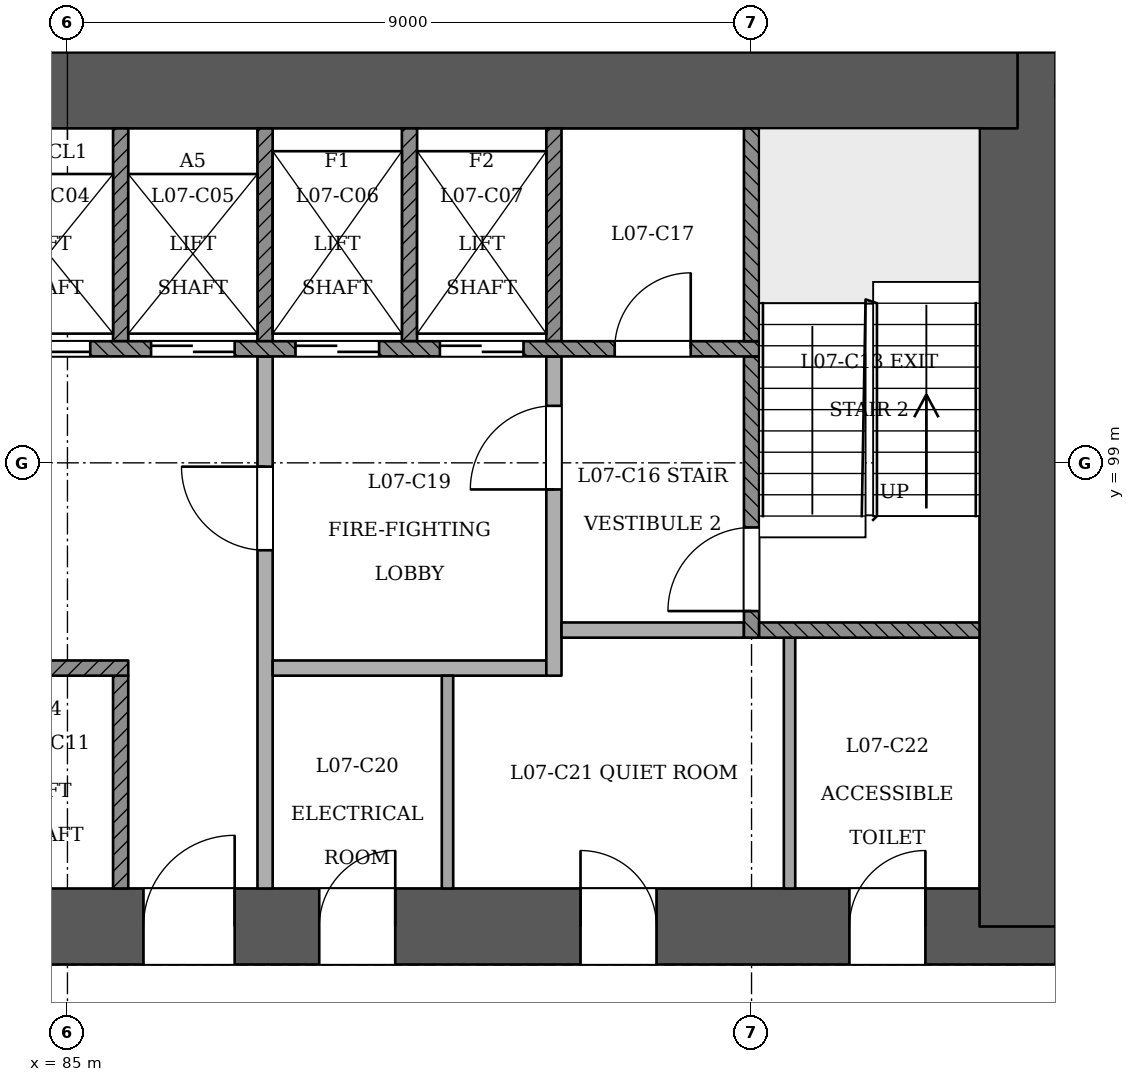
"""IFC4 building model, lengths in metres.
Left out: names, types, materials, properties, quantities, classifications, styles, units other than length and angle.
Written with IfcOpenShell. Run it as: python <this file> out.ifc"""

import sys

from ifc_helpers import new_model, si_unit, direction, frame, frame_2d, origin, place, context, subcontext, project, spatial, rectangle, extrude, element, fill, save


model = new_model("IFC4")
c1 = context("Model", 3, precision=1e-05, world=origin(), true_north=direction((0.0, 1.0)))
c2 = subcontext(c1, "Body", "Model", "MODEL_VIEW")
j1 = project(units=[si_unit("LENGTHUNIT", "METRE"), si_unit("PLANEANGLEUNIT", "RADIAN")], contexts=[c1])
p1 = place(None, origin())
s1 = spatial("IfcSite", under=j1, at=p1, CompositionType="ELEMENT")
p2 = place(p1, origin())
s2 = spatial("IfcBuilding", under=s1, at=p2, CompositionType="ELEMENT")
p3 = place(p2, frame((0.0, 0.0, 34.2)))
s3 = spatial("IfcBuildingStorey", under=s2, at=p3, CompositionType="ELEMENT", Elevation=34.2)
p4 = place(p3, frame((72.5, 92.9, 0.0), z_axis=(0.0, 0.0, 1.0), x_axis=(1.0, 0.0, 0.0)))
e1 = element("IfcWall", 1, at=p4, inside=s3, PredefinedType="SHEAR", context=c2, shape_type="SweptSolid", body=[
    extrude(rectangle(XDim=25.5, YDim=1.0, at=frame_2d((12.75, 0.0))), origin(), (0.0, 0.0, 1.0), 3.6),
])
p5 = place(p4, frame((1.3, 0.0, 0.0)))
e2 = element("IfcOpeningElement", 2, at=p5, cuts=e1, PredefinedType="OPENING", context=c2, shape_type="SweptSolid", body=[
    extrude(rectangle(XDim=1.2, YDim=2.1, at=frame_2d((0.6, 1.05))), frame((0.0, 0.51, 0.0), z_axis=(0.0, -1.0, 0.0), x_axis=(1.0, 0.0, 0.0)), (0.0, 0.0, 1.0), 1.021),
])
p6 = place(p4, frame((3.5, 0.0, 0.0)))
e3 = element("IfcOpeningElement", 3, at=p6, cuts=e1, PredefinedType="OPENING", context=c2, shape_type="SweptSolid", body=[
    extrude(rectangle(XDim=1.2, YDim=2.1, at=frame_2d((0.6, 1.05))), frame((0.0, 0.51, 0.0), z_axis=(0.0, -1.0, 0.0), x_axis=(1.0, 0.0, 0.0)), (0.0, 0.0, 1.0), 1.021),
])
p7 = place(p4, frame((13.5, 0.0, 0.0)))
e4 = element("IfcOpeningElement", 4, at=p7, cuts=e1, PredefinedType="OPENING", context=c2, shape_type="SweptSolid", body=[
    extrude(rectangle(XDim=1.2, YDim=2.1, at=frame_2d((0.6, 1.05))), frame((0.0, 0.51, 0.0), z_axis=(0.0, -1.0, 0.0), x_axis=(1.0, 0.0, 0.0)), (0.0, 0.0, 1.0), 1.021),
])
p8 = place(p4, frame((15.812, 0.0, 0.0)))
e5 = element("IfcOpeningElement", 5, at=p8, cuts=e1, PredefinedType="OPENING", context=c2, shape_type="SweptSolid", body=[
    extrude(rectangle(XDim=1.0, YDim=2.1, at=frame_2d((0.5, 1.05))), frame((0.0, 0.51, 0.0), z_axis=(0.0, -1.0, 0.0), x_axis=(1.0, 0.0, 0.0)), (0.0, 0.0, 1.0), 1.021),
])
p9 = place(p4, frame((19.25, 0.0, 0.0)))
e6 = element("IfcOpeningElement", 6, at=p9, cuts=e1, PredefinedType="OPENING", context=c2, shape_type="SweptSolid", body=[
    extrude(rectangle(XDim=1.0, YDim=2.1, at=frame_2d((0.5, 1.05))), frame((0.0, 0.51, 0.0), z_axis=(0.0, -1.0, 0.0), x_axis=(1.0, 0.0, 0.0)), (0.0, 0.0, 1.0), 1.021),
])
p10 = place(p4, frame((22.788, 0.0, 0.0)))
e7 = element("IfcOpeningElement", 7, at=p10, cuts=e1, PredefinedType="OPENING", context=c2, shape_type="SweptSolid", body=[
    extrude(rectangle(XDim=1.0, YDim=2.1, at=frame_2d((0.5, 1.05))), frame((0.0, 0.51, 0.0), z_axis=(0.0, -1.0, 0.0), x_axis=(1.0, 0.0, 0.0)), (0.0, 0.0, 1.0), 1.021),
])
p11 = place(p3, frame((97.5, 92.9, 0.0), z_axis=(0.0, 0.0, 1.0), x_axis=(0.0, 1.0, 0.0)))
e8 = element("IfcWall", 8, at=p11, inside=s3, PredefinedType="SHEAR", context=c2, shape_type="SweptSolid", body=[
    extrude(rectangle(XDim=11.5, YDim=1.0, at=frame_2d((5.75, 0.0))), origin(), (0.0, 0.0, 1.0), 3.6),
])
p12 = place(p3, frame((97.5, 103.9, 0.0), z_axis=(0.0, 0.0, 1.0), x_axis=(-1.0, 0.0, 0.0)))
e9 = element("IfcWall", 9, at=p12, inside=s3, PredefinedType="SHEAR", context=c2, shape_type="SweptSolid", body=[
    extrude(rectangle(XDim=25.5, YDim=1.0, at=frame_2d((12.75, 0.0))), origin(), (0.0, 0.0, 1.0), 3.6),
])
p13 = place(p3, frame((86.17, 57.581, 0.0), z_axis=(0.0, 0.0, 1.0), x_axis=(0.499999785607, 0.866025527565, 0.0)))
e10 = element("IfcWall", 10, at=p13, inside=s3, PredefinedType="PARTITIONING", context=c2, shape_type="SweptSolid", body=[
    extrude(rectangle(XDim=44.909, YDim=0.15, at=frame_2d((22.454, 0.0))), origin(), (0.0, 0.0, 1.0), 2.7),
])
p14 = place(p13, frame((0.675, 0.0, 0.0)))
e11 = element("IfcOpeningElement", 11, at=p14, cuts=e10, PredefinedType="OPENING", context=c2, shape_type="SweptSolid", body=[
    extrude(rectangle(XDim=1.0, YDim=2.1, at=frame_2d((0.5, 1.05))), frame((0.0, 0.085, 0.0), z_axis=(0.0, -1.0, 0.0), x_axis=(1.0, 0.0, 0.0)), (0.0, 0.0, 1.0), 0.171),
])
p15 = place(p13, frame((5.175, 0.0, 0.0)))
e12 = element("IfcOpeningElement", 12, at=p15, cuts=e10, PredefinedType="OPENING", context=c2, shape_type="SweptSolid", body=[
    extrude(rectangle(XDim=1.0, YDim=2.1, at=frame_2d((0.5, 1.05))), frame((0.0, 0.085, 0.0), z_axis=(0.0, -1.0, 0.0), x_axis=(1.0, 0.0, 0.0)), (0.0, 0.0, 1.0), 0.171),
])
p16 = place(p13, frame((11.734, 0.0, 0.0)))
e13 = element("IfcOpeningElement", 13, at=p16, cuts=e10, PredefinedType="OPENING", context=c2, shape_type="SweptSolid", body=[
    extrude(rectangle(XDim=1.0, YDim=2.1, at=frame_2d((0.5, 1.05))), frame((0.0, 0.085, 0.0), z_axis=(0.0, -1.0, 0.0), x_axis=(1.0, 0.0, 0.0)), (0.0, 0.0, 1.0), 0.171),
])
p17 = place(p13, frame((14.175, 0.0, 0.0)))
e14 = element("IfcOpeningElement", 14, at=p17, cuts=e10, PredefinedType="OPENING", context=c2, shape_type="SweptSolid", body=[
    extrude(rectangle(XDim=1.0, YDim=2.1, at=frame_2d((0.5, 1.05))), frame((0.0, 0.085, 0.0), z_axis=(0.0, -1.0, 0.0), x_axis=(1.0, 0.0, 0.0)), (0.0, 0.0, 1.0), 0.171),
])
p18 = place(p13, frame((19.704, 0.0, 0.0)))
e15 = element("IfcOpeningElement", 15, at=p18, cuts=e10, PredefinedType="OPENING", context=c2, shape_type="SweptSolid", body=[
    extrude(rectangle(XDim=1.0, YDim=2.1, at=frame_2d((0.5, 1.05))), frame((0.0, 0.085, 0.0), z_axis=(0.0, -1.0, 0.0), x_axis=(1.0, 0.0, 0.0)), (0.0, 0.0, 1.0), 0.171),
])
p19 = place(p13, frame((23.175, 0.0, 0.0)))
e16 = element("IfcOpeningElement", 16, at=p19, cuts=e10, PredefinedType="OPENING", context=c2, shape_type="SweptSolid", body=[
    extrude(rectangle(XDim=1.0, YDim=2.1, at=frame_2d((0.5, 1.05))), frame((0.0, 0.085, 0.0), z_axis=(0.0, -1.0, 0.0), x_axis=(1.0, 0.0, 0.0)), (0.0, 0.0, 1.0), 0.171),
])
p20 = place(p13, frame((29.85, 0.0, 0.0)))
e17 = element("IfcOpeningElement", 17, at=p20, cuts=e10, PredefinedType="OPENING", context=c2, shape_type="SweptSolid", body=[
    extrude(rectangle(XDim=1.0, YDim=2.1, at=frame_2d((0.5, 1.05))), frame((0.0, 0.085, 0.0), z_axis=(0.0, -1.0, 0.0), x_axis=(1.0, 0.0, 0.0)), (0.0, 0.0, 1.0), 0.171),
])
p21 = place(p13, frame((32.059, 0.0, 0.0)))
e18 = element("IfcOpeningElement", 18, at=p21, cuts=e10, PredefinedType="OPENING", context=c2, shape_type="SweptSolid", body=[
    extrude(rectangle(XDim=1.0, YDim=2.1, at=frame_2d((0.5, 1.05))), frame((0.0, 0.085, 0.0), z_axis=(0.0, -1.0, 0.0), x_axis=(1.0, 0.0, 0.0)), (0.0, 0.0, 1.0), 0.171),
])
p22 = place(p13, frame((38.734, 0.0, 0.0)))
e19 = element("IfcOpeningElement", 19, at=p22, cuts=e10, PredefinedType="OPENING", context=c2, shape_type="SweptSolid", body=[
    extrude(rectangle(XDim=1.0, YDim=2.1, at=frame_2d((0.5, 1.05))), frame((0.0, 0.085, 0.0), z_axis=(0.0, -1.0, 0.0), x_axis=(1.0, 0.0, 0.0)), (0.0, 0.0, 1.0), 0.171),
])
p23 = place(p13, frame((41.025, 0.0, 0.0)))
e20 = element("IfcOpeningElement", 20, at=p23, cuts=e10, PredefinedType="OPENING", context=c2, shape_type="SweptSolid", body=[
    extrude(rectangle(XDim=1.1, YDim=2.1, at=frame_2d((0.55, 1.05))), frame((0.0, 0.085, 0.0), z_axis=(0.0, -1.0, 0.0), x_axis=(1.0, 0.0, 0.0)), (0.0, 0.0, 1.0), 0.171),
])
p24 = place(p3, frame((85.7, 93.4, 0.0), z_axis=(0.0, 0.0, 1.0), x_axis=(0.0, 1.0, 0.0)))
e21 = element("IfcWall", 21, at=p24, inside=s3, PredefinedType="SOLIDWALL", context=c2, shape_type="SweptSolid", body=[
    extrude(rectangle(XDim=2.8, YDim=0.2, at=frame_2d((1.4, 0.0))), origin(), (0.0, 0.0, 1.0), 3.1),
])
p25 = place(p3, frame((87.6, 93.4, 0.0), z_axis=(0.0, 0.0, 1.0), x_axis=(0.0, 1.0, 0.0)))
e22 = element("IfcWall", 22, at=p25, inside=s3, PredefinedType="PARTITIONING", context=c2, shape_type="SweptSolid", body=[
    extrude(rectangle(XDim=7.0, YDim=0.2, at=frame_2d((3.5, 0.0))), origin(), (0.0, 0.0, 1.0), 3.1),
])
p26 = place(p25, frame((4.45, 0.0, 0.0)))
e23 = element("IfcOpeningElement", 23, at=p26, cuts=e22, PredefinedType="OPENING", context=c2, shape_type="SweptSolid", body=[
    extrude(rectangle(XDim=1.1, YDim=2.1, at=frame_2d((0.55, 1.05))), frame((0.0, 0.11, 0.0), z_axis=(0.0, -1.0, 0.0), x_axis=(1.0, 0.0, 0.0)), (0.0, 0.0, 1.0), 0.221),
])
p27 = place(p3, frame((90.0, 93.4, 0.0), z_axis=(0.0, 0.0, 1.0), x_axis=(0.0, 1.0, 0.0)))
e24 = element("IfcWall", 24, at=p27, inside=s3, PredefinedType="PARTITIONING", context=c2, shape_type="SweptSolid", body=[
    extrude(rectangle(XDim=2.8, YDim=0.15, at=frame_2d((1.4, 0.0))), origin(), (0.0, 0.0, 1.0), 3.1),
])
p28 = place(p3, frame((94.5, 93.4, 0.0), z_axis=(0.0, 0.0, 1.0), x_axis=(0.0, 1.0, 0.0)))
e25 = element("IfcWall", 25, at=p28, inside=s3, PredefinedType="PARTITIONING", context=c2, shape_type="SweptSolid", body=[
    extrude(rectangle(XDim=3.3, YDim=0.15, at=frame_2d((1.65, 0.0))), origin(), (0.0, 0.0, 1.0), 3.1),
])
p29 = place(p3, frame((78.0, 96.3, 0.0), z_axis=(0.0, 0.0, 1.0), x_axis=(1.0, 0.0, 0.0)))
e26 = element("IfcWall", 26, at=p29, inside=s3, PredefinedType="SOLIDWALL", context=c2, shape_type="SweptSolid", body=[
    extrude(rectangle(XDim=7.8, YDim=0.2, at=frame_2d((3.9, 0.0))), origin(), (0.0, 0.0, 1.0), 3.1),
])
p30 = place(p3, frame((87.7, 96.3, 0.0), z_axis=(0.0, 0.0, 1.0), x_axis=(1.0, 0.0, 0.0)))
e27 = element("IfcWall", 27, at=p30, inside=s3, PredefinedType="PARTITIONING", context=c2, shape_type="SweptSolid", body=[
    extrude(rectangle(XDim=3.6, YDim=0.2, at=frame_2d((1.8, 0.0))), origin(), (0.0, 0.0, 1.0), 3.1),
])
p31 = place(p3, frame((91.4, 96.2, 0.0), z_axis=(0.0, 0.0, 1.0), x_axis=(0.0, 1.0, 0.0)))
e28 = element("IfcWall", 28, at=p31, inside=s3, PredefinedType="PARTITIONING", context=c2, shape_type="SweptSolid", body=[
    extrude(rectangle(XDim=4.2, YDim=0.2, at=frame_2d((2.1, 0.0))), origin(), (0.0, 0.0, 1.0), 3.1),
])
p32 = place(p31, frame((2.45, 0.0, 0.0)))
e29 = element("IfcOpeningElement", 29, at=p32, cuts=e28, PredefinedType="OPENING", context=c2, shape_type="SweptSolid", body=[
    extrude(rectangle(XDim=1.1, YDim=2.1, at=frame_2d((0.55, 1.05))), frame((0.0, 0.11, 0.0), z_axis=(0.0, -1.0, 0.0), x_axis=(1.0, 0.0, 0.0)), (0.0, 0.0, 1.0), 0.221),
])
p33 = place(p3, frame((91.5, 96.8, 0.0), z_axis=(0.0, 0.0, 1.0), x_axis=(1.0, 0.0, 0.0)))
e30 = element("IfcWall", 30, at=p33, inside=s3, PredefinedType="PARTITIONING", context=c2, shape_type="SweptSolid", body=[
    extrude(rectangle(XDim=2.4, YDim=0.2, at=frame_2d((1.2, 0.0))), origin(), (0.0, 0.0, 1.0), 3.1),
])
p34 = place(p3, frame((94.0, 96.7, 0.0), z_axis=(0.0, 0.0, 1.0), x_axis=(0.0, 1.0, 0.0)))
e31 = element("IfcWall", 31, at=p34, inside=s3, PredefinedType="SOLIDWALL", context=c2, shape_type="SweptSolid", body=[
    extrude(rectangle(XDim=3.7, YDim=0.2, at=frame_2d((1.85, 0.0))), origin(), (0.0, 0.0, 1.0), 3.1),
])
p35 = place(p34, frame((0.35, 0.0, 0.0)))
e32 = element("IfcOpeningElement", 32, at=p35, cuts=e31, PredefinedType="OPENING", context=c2, shape_type="SweptSolid", body=[
    extrude(rectangle(XDim=1.1, YDim=2.1, at=frame_2d((0.55, 1.05))), frame((0.0, 0.11, 0.0), z_axis=(0.0, -1.0, 0.0), x_axis=(1.0, 0.0, 0.0)), (0.0, 0.0, 1.0), 0.221),
])
p36 = place(p3, frame((94.1, 96.8, 0.0), z_axis=(0.0, 0.0, 1.0), x_axis=(1.0, 0.0, 0.0)))
e33 = element("IfcWall", 33, at=p36, inside=s3, PredefinedType="SOLIDWALL", context=c2, shape_type="SweptSolid", body=[
    extrude(rectangle(XDim=2.9, YDim=0.2, at=frame_2d((1.45, 0.0))), origin(), (0.0, 0.0, 1.0), 3.1),
])
p37 = place(p3, frame((75.9, 100.5, 0.0), z_axis=(0.0, 0.0, 1.0), x_axis=(1.0, 0.0, 0.0)))
e34 = element("IfcWall", 34, at=p37, inside=s3, PredefinedType="SOLIDWALL", context=c2, shape_type="SweptSolid", body=[
    extrude(rectangle(XDim=18.2, YDim=0.2, at=frame_2d((9.1, 0.0))), origin(), (0.0, 0.0, 1.0), 3.1),
])
p38 = place(p37, frame((2.6, 0.0, 0.0)))
e35 = element("IfcOpeningElement", 35, at=p38, cuts=e34, PredefinedType="OPENING", context=c2, shape_type="SweptSolid", body=[
    extrude(rectangle(XDim=1.1, YDim=2.1, at=frame_2d((0.55, 1.05))), frame((0.0, 0.11, 0.0), z_axis=(0.0, -1.0, 0.0), x_axis=(1.0, 0.0, 0.0)), (0.0, 0.0, 1.0), 0.221),
])
p39 = place(p37, frame((4.5, 0.0, 0.0)))
e36 = element("IfcOpeningElement", 36, at=p39, cuts=e34, PredefinedType="OPENING", context=c2, shape_type="SweptSolid", body=[
    extrude(rectangle(XDim=1.1, YDim=2.1, at=frame_2d((0.55, 1.05))), frame((0.0, 0.11, 0.0), z_axis=(0.0, -1.0, 0.0), x_axis=(1.0, 0.0, 0.0)), (0.0, 0.0, 1.0), 0.221),
])
p40 = place(p37, frame((6.4, 0.0, 0.0)))
e37 = element("IfcOpeningElement", 37, at=p40, cuts=e34, PredefinedType="OPENING", context=c2, shape_type="SweptSolid", body=[
    extrude(rectangle(XDim=1.1, YDim=2.1, at=frame_2d((0.55, 1.05))), frame((0.0, 0.11, 0.0), z_axis=(0.0, -1.0, 0.0), x_axis=(1.0, 0.0, 0.0)), (0.0, 0.0, 1.0), 0.221),
])
p41 = place(p37, frame((8.3, 0.0, 0.0)))
e38 = element("IfcOpeningElement", 38, at=p41, cuts=e34, PredefinedType="OPENING", context=c2, shape_type="SweptSolid", body=[
    extrude(rectangle(XDim=1.1, YDim=2.1, at=frame_2d((0.55, 1.05))), frame((0.0, 0.11, 0.0), z_axis=(0.0, -1.0, 0.0), x_axis=(1.0, 0.0, 0.0)), (0.0, 0.0, 1.0), 0.221),
])
p42 = place(p37, frame((10.2, 0.0, 0.0)))
e39 = element("IfcOpeningElement", 39, at=p42, cuts=e34, PredefinedType="OPENING", context=c2, shape_type="SweptSolid", body=[
    extrude(rectangle(XDim=1.1, YDim=2.1, at=frame_2d((0.55, 1.05))), frame((0.0, 0.11, 0.0), z_axis=(0.0, -1.0, 0.0), x_axis=(1.0, 0.0, 0.0)), (0.0, 0.0, 1.0), 0.221),
])
p43 = place(p37, frame((12.1, 0.0, 0.0)))
e40 = element("IfcOpeningElement", 40, at=p43, cuts=e34, PredefinedType="OPENING", context=c2, shape_type="SweptSolid", body=[
    extrude(rectangle(XDim=1.1, YDim=2.1, at=frame_2d((0.55, 1.05))), frame((0.0, 0.11, 0.0), z_axis=(0.0, -1.0, 0.0), x_axis=(1.0, 0.0, 0.0)), (0.0, 0.0, 1.0), 0.221),
])
p44 = place(p37, frame((14.0, 0.0, 0.0)))
e41 = element("IfcOpeningElement", 41, at=p44, cuts=e34, PredefinedType="OPENING", context=c2, shape_type="SweptSolid", body=[
    extrude(rectangle(XDim=1.1, YDim=2.1, at=frame_2d((0.55, 1.05))), frame((0.0, 0.11, 0.0), z_axis=(0.0, -1.0, 0.0), x_axis=(1.0, 0.0, 0.0)), (0.0, 0.0, 1.0), 0.221),
])
p45 = place(p37, frame((0.65, 0.0, 0.0)))
e42 = element("IfcOpeningElement", 42, at=p45, cuts=e34, PredefinedType="OPENING", context=c2, shape_type="SweptSolid", body=[
    extrude(rectangle(XDim=1.0, YDim=2.1, at=frame_2d((0.5, 1.05))), frame((0.0, 0.11, 0.0), z_axis=(0.0, -1.0, 0.0), x_axis=(1.0, 0.0, 0.0)), (0.0, 0.0, 1.0), 0.221),
])
p46 = place(p37, frame((16.3, 0.0, 0.0)))
e43 = element("IfcOpeningElement", 43, at=p46, cuts=e34, PredefinedType="OPENING", context=c2, shape_type="SweptSolid", body=[
    extrude(rectangle(XDim=1.0, YDim=2.1, at=frame_2d((0.5, 1.05))), frame((0.0, 0.11, 0.0), z_axis=(0.0, -1.0, 0.0), x_axis=(1.0, 0.0, 0.0)), (0.0, 0.0, 1.0), 0.221),
])
for number, where, z_axis, x_axis in (
    (44, (85.7, 100.6, 0.0), (0.0, 0.0, 1.0), (0.0, 1.0, 0.0)),
    (45, (87.6, 100.6, 0.0), (0.0, 0.0, 1.0), (0.0, 1.0, 0.0)),
    (46, (89.5, 100.6, 0.0), (0.0, 0.0, 1.0), (0.0, 1.0, 0.0)),
    (47, (91.4, 100.6, 0.0), (0.0, 0.0, 1.0), (0.0, 1.0, 0.0)),
    (48, (94.0, 100.6, 0.0), (0.0, 0.0, 1.0), (0.0, 1.0, 0.0)),
):
    element("IfcWall", number, at=place(p3, frame(where, z_axis=z_axis, x_axis=x_axis)), inside=s3, PredefinedType="SOLIDWALL", context=c2, shape_type="SweptSolid", body=[
        extrude(rectangle(XDim=2.8, YDim=0.2, at=frame_2d((1.4, 0.0))), origin(), (0.0, 0.0, 1.0), 3.1),
    ])
p47 = place(p41, origin())
e49 = element("IfcDoor", 49, at=p47, inside=s3, OperationType="SLIDING_TO_LEFT", PredefinedType="NOTDEFINED", context=c2, shape_type="SweptSolid", body=[
    extrude(rectangle(XDim=1.1, YDim=2.1, at=frame_2d((0.55, 1.05))), frame((0.0, 0.025, 0.0), z_axis=(0.0, -1.0, 0.0), x_axis=(1.0, 0.0, 0.0)), (0.0, 0.0, 1.0), 0.05),
])
fill(e38, e49)
p48 = place(p42, origin())
e50 = element("IfcDoor", 50, at=p48, inside=s3, OperationType="SLIDING_TO_RIGHT", PredefinedType="NOTDEFINED", context=c2, shape_type="SweptSolid", body=[
    extrude(rectangle(XDim=1.1, YDim=2.1, at=frame_2d((0.55, 1.05))), frame((0.0, 0.025, 0.0), z_axis=(0.0, -1.0, 0.0), x_axis=(1.0, 0.0, 0.0)), (0.0, 0.0, 1.0), 0.05),
])
fill(e39, e50)
p49 = place(p43, origin())
e51 = element("IfcDoor", 51, at=p49, inside=s3, OperationType="SLIDING_TO_RIGHT", PredefinedType="NOTDEFINED", context=c2, shape_type="SweptSolid", body=[
    extrude(rectangle(XDim=1.1, YDim=2.1, at=frame_2d((0.55, 1.05))), frame((0.0, 0.025, 0.0), z_axis=(0.0, -1.0, 0.0), x_axis=(1.0, 0.0, 0.0)), (0.0, 0.0, 1.0), 0.05),
])
fill(e40, e51)
p50 = place(p44, origin())
e52 = element("IfcDoor", 52, at=p50, inside=s3, OperationType="SLIDING_TO_LEFT", PredefinedType="NOTDEFINED", context=c2, shape_type="SweptSolid", body=[
    extrude(rectangle(XDim=1.1, YDim=2.1, at=frame_2d((0.55, 1.05))), frame((0.0, 0.025, 0.0), z_axis=(0.0, -1.0, 0.0), x_axis=(1.0, 0.0, 0.0)), (0.0, 0.0, 1.0), 0.05),
])
fill(e41, e52)
p51 = place(p35, origin())
e53 = element("IfcDoor", 53, at=p51, inside=s3, OperationType="SINGLE_SWING_LEFT", PredefinedType="NOTDEFINED", context=c2, shape_type="SweptSolid", body=[
    extrude(rectangle(XDim=1.1, YDim=2.1, at=frame_2d((0.55, 1.05))), frame((0.0, 0.025, 0.0), z_axis=(0.0, -1.0, 0.0), x_axis=(1.0, 0.0, 0.0)), (0.0, 0.0, 1.0), 0.05),
])
fill(e32, e53)
p52 = place(p26, origin())
e54 = element("IfcDoor", 54, at=p52, inside=s3, OperationType="SINGLE_SWING_RIGHT", PredefinedType="NOTDEFINED", context=c2, shape_type="SweptSolid", body=[
    extrude(rectangle(XDim=1.1, YDim=2.1, at=frame_2d((0.55, 1.05))), frame((0.0, 0.025, 0.0), z_axis=(0.0, -1.0, 0.0), x_axis=(1.0, 0.0, 0.0)), (0.0, 0.0, 1.0), 0.05),
])
fill(e23, e54)
p53 = place(p32, origin())
e55 = element("IfcDoor", 55, at=p53, inside=s3, OperationType="SINGLE_SWING_LEFT", PredefinedType="NOTDEFINED", context=c2, shape_type="SweptSolid", body=[
    extrude(rectangle(XDim=1.1, YDim=2.1, at=frame_2d((0.55, 1.05))), frame((0.0, 0.025, 0.0), z_axis=(0.0, -1.0, 0.0), x_axis=(1.0, 0.0, 0.0)), (0.0, 0.0, 1.0), 0.05),
])
fill(e29, e55)
p54 = place(p7, origin())
e56 = element("IfcDoor", 56, at=p54, inside=s3, OperationType="SINGLE_SWING_RIGHT", PredefinedType="NOTDEFINED", context=c2, shape_type="SweptSolid", body=[
    extrude(rectangle(XDim=1.2, YDim=2.1, at=frame_2d((0.6, 1.05))), frame((0.0, 0.025, 0.0), z_axis=(0.0, -1.0, 0.0), x_axis=(1.0, 0.0, 0.0)), (0.0, 0.0, 1.0), 0.05),
])
fill(e4, e56)
p55 = place(p46, origin())
e57 = element("IfcDoor", 57, at=p55, inside=s3, OperationType="SINGLE_SWING_RIGHT", PredefinedType="NOTDEFINED", context=c2, shape_type="SweptSolid", body=[
    extrude(rectangle(XDim=1.0, YDim=2.1, at=frame_2d((0.5, 1.05))), frame((0.0, 0.025, 0.0), z_axis=(0.0, -1.0, 0.0), x_axis=(1.0, 0.0, 0.0)), (0.0, 0.0, 1.0), 0.05),
])
fill(e43, e57)
p56 = place(p8, origin())
e58 = element("IfcDoor", 58, at=p56, inside=s3, OperationType="SINGLE_SWING_RIGHT", PredefinedType="NOTDEFINED", context=c2, shape_type="SweptSolid", body=[
    extrude(rectangle(XDim=1.0, YDim=2.1, at=frame_2d((0.5, 1.05))), frame((0.0, 0.025, 0.0), z_axis=(0.0, -1.0, 0.0), x_axis=(1.0, 0.0, 0.0)), (0.0, 0.0, 1.0), 0.05),
])
fill(e5, e58)
p57 = place(p9, origin())
e59 = element("IfcDoor", 59, at=p57, inside=s3, OperationType="SINGLE_SWING_LEFT", PredefinedType="NOTDEFINED", context=c2, shape_type="SweptSolid", body=[
    extrude(rectangle(XDim=1.0, YDim=2.1, at=frame_2d((0.5, 1.05))), frame((0.0, 0.025, 0.0), z_axis=(0.0, -1.0, 0.0), x_axis=(1.0, 0.0, 0.0)), (0.0, 0.0, 1.0), 0.05),
])
fill(e6, e59)
p58 = place(p10, origin())
e60 = element("IfcDoor", 60, at=p58, inside=s3, OperationType="SINGLE_SWING_RIGHT", PredefinedType="NOTDEFINED", context=c2, shape_type="SweptSolid", body=[
    extrude(rectangle(XDim=1.0, YDim=2.1, at=frame_2d((0.5, 1.05))), frame((0.0, 0.025, 0.0), z_axis=(0.0, -1.0, 0.0), x_axis=(1.0, 0.0, 0.0)), (0.0, 0.0, 1.0), 0.05),
])
fill(e7, e60)
save(model, sys.argv[1])
